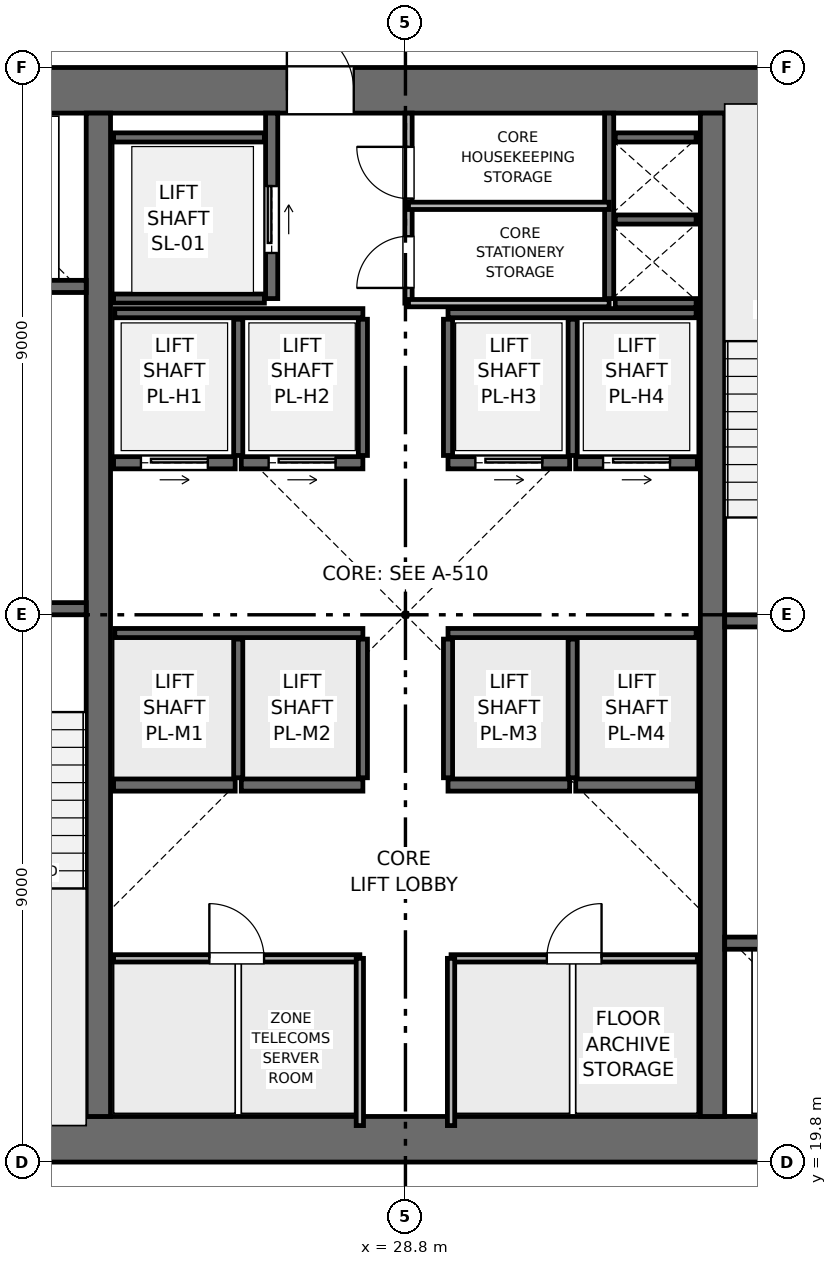
"""IFC4 building model, lengths in metres.
Left out: names, types, materials, properties, quantities, classifications, styles, units other than length and angle.
Written with IfcOpenShell. Run it as: python <this file> out.ifc"""

import sys

from ifc_helpers import new_model, si_unit, direction, frame, frame_2d, origin, place, context, subcontext, project, spatial, rectangle, extrude, element, fill, save


model = new_model("IFC4")
c1 = context("Model", 3, precision=1e-05, world=origin(), true_north=direction((0.0, 1.0)))
c2 = subcontext(c1, "Body", "Model", "MODEL_VIEW")
j1 = project(units=[si_unit("LENGTHUNIT", "METRE"), si_unit("PLANEANGLEUNIT", "RADIAN")], contexts=[c1])
p1 = place(None, origin())
s1 = spatial("IfcSite", under=j1, at=p1, CompositionType="ELEMENT")
p2 = place(p1, origin())
s2 = spatial("IfcBuilding", under=s1, at=p2, CompositionType="ELEMENT")
p3 = place(p2, frame((0.0, 0.0, 246.6)))
s3 = spatial("IfcBuildingStorey", under=s2, at=p3, CompositionType="ELEMENT", Elevation=246.6)
p4 = place(p3, frame((19.8, 20.175, 0.0), z_axis=(0.0, 0.0, 1.0), x_axis=(1.0, 0.0, 0.0)))
e1 = element("IfcWall", 1, at=p4, inside=s3, PredefinedType="SHEAR", context=c2, shape_type="SweptSolid", body=[
    extrude(rectangle(XDim=18.0, YDim=0.75, at=frame_2d((9.0, 0.0))), origin(), (0.0, 0.0, 1.0), 3.75),
])
p5 = place(p3, frame((19.8, 37.425, 0.0), z_axis=(0.0, 0.0, 1.0), x_axis=(1.0, 0.0, 0.0)))
e2 = element("IfcWall", 2, at=p5, inside=s3, PredefinedType="SHEAR", context=c2, shape_type="SweptSolid", body=[
    extrude(rectangle(XDim=18.0, YDim=0.75, at=frame_2d((9.0, 0.0))), origin(), (0.0, 0.0, 1.0), 3.75),
])
p6 = place(p5, frame((7.05, 0.0, 0.0)))
e3 = element("IfcOpeningElement", 3, at=p6, cuts=e2, PredefinedType="OPENING", context=c2, shape_type="SweptSolid", body=[
    extrude(rectangle(XDim=1.1, YDim=2.15, at=frame_2d((0.55, 1.075))), frame((0.0, 0.385, 0.0), z_axis=(0.0, -1.0, 0.0), x_axis=(1.0, 0.0, 0.0)), (0.0, 0.0, 1.0), 0.77),
])
for number, where, z_axis, x_axis in (
    (4, (23.75, 20.55, 0.0), (0.0, 0.0, 1.0), (0.0, 1.0, 0.0)),
    (5, (33.85, 20.55, 0.0), (0.0, 0.0, 1.0), (0.0, 1.0, 0.0)),
):
    element("IfcWall", number, at=place(p3, frame(where, z_axis=z_axis, x_axis=x_axis)), inside=s3, PredefinedType="SHEAR", context=c2, shape_type="SweptSolid", body=[
        extrude(rectangle(XDim=16.5, YDim=0.4, at=frame_2d((8.25, 0.0))), origin(), (0.0, 0.0, 1.0), 3.75),
    ])
p7 = place(p3, frame((20.4, 28.9, 0.0), z_axis=(0.0, 0.0, 1.0), x_axis=(1.0, 0.0, 0.0)))
e6 = element("IfcWall", 6, at=p7, inside=s3, PredefinedType="SHEAR", context=c2, shape_type="SweptSolid", body=[
    extrude(rectangle(XDim=3.15, YDim=0.2, at=frame_2d((1.575, 0.0))), origin(), (0.0, 0.0, 1.0), 3.5),
])
p8 = place(p7, frame((0.8, 0.0, 0.0)))
e7 = element("IfcOpeningElement", 7, at=p8, cuts=e6, PredefinedType="OPENING", context=c2, shape_type="SweptSolid", body=[
    extrude(rectangle(XDim=1.0, YDim=2.1, at=frame_2d((0.5, 1.05))), frame((0.0, 0.11, 0.0), z_axis=(0.0, -1.0, 0.0), x_axis=(1.0, 0.0, 0.0)), (0.0, 0.0, 1.0), 0.22),
])
p9 = place(p3, frame((34.05, 28.7, 0.0), z_axis=(0.0, 0.0, 1.0), x_axis=(1.0, 0.0, 0.0)))
e8 = element("IfcWall", 8, at=p9, inside=s3, PredefinedType="SHEAR", context=c2, shape_type="SweptSolid", body=[
    extrude(rectangle(XDim=3.15, YDim=0.2, at=frame_2d((1.575, 0.0))), origin(), (0.0, 0.0, 1.0), 3.5),
])
p10 = place(p9, frame((0.8, 0.0, 0.0)))
e9 = element("IfcOpeningElement", 9, at=p10, cuts=e8, PredefinedType="OPENING", context=c2, shape_type="SweptSolid", body=[
    extrude(rectangle(XDim=1.0, YDim=2.1, at=frame_2d((0.5, 1.05))), frame((0.0, 0.11, 0.0), z_axis=(0.0, -1.0, 0.0), x_axis=(1.0, 0.0, 0.0)), (0.0, 0.0, 1.0), 0.22),
])
p11 = place(p3, frame((32.15, 34.0, 0.0), z_axis=(0.0, 0.0, 1.0), x_axis=(0.0, 1.0, 0.0)))
e10 = element("IfcWall", 10, at=p11, inside=s3, PredefinedType="SHEAR", context=c2, shape_type="SweptSolid", body=[
    extrude(rectangle(XDim=3.05, YDim=0.15, at=frame_2d((1.525, 0.0))), origin(), (0.0, 0.0, 1.0), 3.5),
])
for number, where, z_axis, x_axis in (
    (11, (32.25, 33.925, 0.0), (0.0, 0.0, 1.0), (1.0, 0.0, 0.0)),
    (12, (32.25, 35.3, 0.0), (0.0, 0.0, 1.0), (1.0, 0.0, 0.0)),
):
    element("IfcWall", number, at=place(p3, frame(where, z_axis=z_axis, x_axis=x_axis)), inside=s3, PredefinedType="SHEAR", context=c2, shape_type="SweptSolid", body=[
        extrude(rectangle(XDim=1.33, YDim=0.15, at=frame_2d((0.665, 0.0))), origin(), (0.0, 0.0, 1.0), 3.5),
    ])
p12 = place(p3, frame((20.5, 34.2, 0.0), z_axis=(0.0, 0.0, 1.0), x_axis=(1.0, 0.0, 0.0)))
e13 = element("IfcWall", 13, at=p12, inside=s3, PredefinedType="SHEAR", context=c2, shape_type="SweptSolid", body=[
    extrude(rectangle(XDim=3.05, YDim=0.2, at=frame_2d((1.525, 0.0))), origin(), (0.0, 0.0, 1.0), 3.5),
])
p13 = place(p12, frame((0.75, 0.0, 0.0)))
e14 = element("IfcOpeningElement", 14, at=p13, cuts=e13, PredefinedType="OPENING", context=c2, shape_type="SweptSolid", body=[
    extrude(rectangle(XDim=1.1, YDim=2.15, at=frame_2d((0.55, 1.075))), frame((0.0, 0.11, 0.0), z_axis=(0.0, -1.0, 0.0), x_axis=(1.0, 0.0, 0.0)), (0.0, 0.0, 1.0), 0.22),
])
p14 = place(p3, frame((34.05, 23.4, 0.0), z_axis=(0.0, 0.0, 1.0), x_axis=(1.0, 0.0, 0.0)))
e15 = element("IfcWall", 15, at=p14, inside=s3, PredefinedType="SHEAR", context=c2, shape_type="SweptSolid", body=[
    extrude(rectangle(XDim=3.05, YDim=0.2, at=frame_2d((1.525, 0.0))), origin(), (0.0, 0.0, 1.0), 3.5),
])
p15 = place(p14, frame((1.2, 0.0, 0.0)))
e16 = element("IfcOpeningElement", 16, at=p15, cuts=e15, PredefinedType="OPENING", context=c2, shape_type="SweptSolid", body=[
    extrude(rectangle(XDim=1.1, YDim=2.15, at=frame_2d((0.55, 1.075))), frame((0.0, 0.11, 0.0), z_axis=(0.0, -1.0, 0.0), x_axis=(1.0, 0.0, 0.0)), (0.0, 0.0, 1.0), 0.22),
])
p16 = place(p3, frame((26.6, 34.0, 0.0), z_axis=(0.0, 0.0, 1.0), x_axis=(0.0, 1.0, 0.0)))
e17 = element("IfcWall", 17, at=p16, inside=s3, PredefinedType="SHEAR", context=c2, shape_type="SweptSolid", body=[
    extrude(rectangle(XDim=3.05, YDim=0.2, at=frame_2d((1.525, 0.0))), origin(), (0.0, 0.0, 1.0), 3.5),
])
p17 = place(p16, frame((0.75, 0.0, 0.0)))
e18 = element("IfcOpeningElement", 18, at=p17, cuts=e17, PredefinedType="OPENING", context=c2, shape_type="SweptSolid", body=[
    extrude(rectangle(XDim=1.1, YDim=2.15, at=frame_2d((0.55, 1.075))), frame((0.0, 0.11, 0.0), z_axis=(0.0, -1.0, 0.0), x_axis=(1.0, 0.0, 0.0)), (0.0, 0.0, 1.0), 0.22),
])
for number, where, z_axis, x_axis in (
    (19, (24.0, 34.0, 0.0), (0.0, 0.0, 1.0), (1.0, 0.0, 0.0)),
    (20, (24.0, 36.65, 0.0), (0.0, 0.0, 1.0), (1.0, 0.0, 0.0)),
):
    element("IfcWall", number, at=place(p3, frame(where, z_axis=z_axis, x_axis=x_axis)), inside=s3, PredefinedType="SHEAR", context=c2, shape_type="SweptSolid", body=[
        extrude(rectangle(XDim=2.48, YDim=0.15, at=frame_2d((1.24, 0.0))), origin(), (0.0, 0.0, 1.0), 3.5),
    ])
for number, where, z_axis, x_axis in (
    (21, (24.0, 26.0, 0.0), (0.0, 0.0, 1.0), (1.0, 0.0, 0.0)),
    (22, (26.1, 26.0, 0.0), (0.0, 0.0, 1.0), (1.0, 0.0, 0.0)),
    (23, (29.5, 26.0, 0.0), (0.0, 0.0, 1.0), (1.0, 0.0, 0.0)),
    (24, (31.6, 26.0, 0.0), (0.0, 0.0, 1.0), (1.0, 0.0, 0.0)),
):
    element("IfcWall", number, at=place(p3, frame(where, z_axis=z_axis, x_axis=x_axis)), inside=s3, PredefinedType="SHEAR", context=c2, shape_type="SweptSolid", body=[
        extrude(rectangle(XDim=2.0, YDim=0.2, at=frame_2d((1.0, 0.0))), origin(), (0.0, 0.0, 1.0), 3.5),
    ])
p18 = place(p3, frame((24.0, 31.3, 0.0), z_axis=(0.0, 0.0, 1.0), x_axis=(1.0, 0.0, 0.0)))
e25 = element("IfcWall", 25, at=p18, inside=s3, PredefinedType="SHEAR", context=c2, shape_type="SweptSolid", body=[
    extrude(rectangle(XDim=2.0, YDim=0.2, at=frame_2d((1.0, 0.0))), origin(), (0.0, 0.0, 1.0), 3.5),
])
p19 = place(p18, frame((0.45, 0.0, 0.0)))
e26 = element("IfcOpeningElement", 26, at=p19, cuts=e25, PredefinedType="OPENING", context=c2, shape_type="SweptSolid", body=[
    extrude(rectangle(XDim=1.1, YDim=2.15, at=frame_2d((0.55, 1.075))), frame((0.0, 0.11, 0.0), z_axis=(0.0, -1.0, 0.0), x_axis=(1.0, 0.0, 0.0)), (0.0, 0.0, 1.0), 0.22),
])
p20 = place(p3, frame((26.1, 31.3, 0.0), z_axis=(0.0, 0.0, 1.0), x_axis=(1.0, 0.0, 0.0)))
e27 = element("IfcWall", 27, at=p20, inside=s3, PredefinedType="SHEAR", context=c2, shape_type="SweptSolid", body=[
    extrude(rectangle(XDim=2.0, YDim=0.2, at=frame_2d((1.0, 0.0))), origin(), (0.0, 0.0, 1.0), 3.5),
])
p21 = place(p20, frame((0.45, 0.0, 0.0)))
e28 = element("IfcOpeningElement", 28, at=p21, cuts=e27, PredefinedType="OPENING", context=c2, shape_type="SweptSolid", body=[
    extrude(rectangle(XDim=1.1, YDim=2.15, at=frame_2d((0.55, 1.075))), frame((0.0, 0.11, 0.0), z_axis=(0.0, -1.0, 0.0), x_axis=(1.0, 0.0, 0.0)), (0.0, 0.0, 1.0), 0.22),
])
p22 = place(p3, frame((29.5, 31.3, 0.0), z_axis=(0.0, 0.0, 1.0), x_axis=(1.0, 0.0, 0.0)))
e29 = element("IfcWall", 29, at=p22, inside=s3, PredefinedType="SHEAR", context=c2, shape_type="SweptSolid", body=[
    extrude(rectangle(XDim=2.0, YDim=0.2, at=frame_2d((1.0, 0.0))), origin(), (0.0, 0.0, 1.0), 3.5),
])
p23 = place(p22, frame((0.45, 0.0, 0.0)))
e30 = element("IfcOpeningElement", 30, at=p23, cuts=e29, PredefinedType="OPENING", context=c2, shape_type="SweptSolid", body=[
    extrude(rectangle(XDim=1.1, YDim=2.15, at=frame_2d((0.55, 1.075))), frame((0.0, 0.11, 0.0), z_axis=(0.0, -1.0, 0.0), x_axis=(1.0, 0.0, 0.0)), (0.0, 0.0, 1.0), 0.22),
])
p24 = place(p3, frame((31.6, 31.3, 0.0), z_axis=(0.0, 0.0, 1.0), x_axis=(1.0, 0.0, 0.0)))
e31 = element("IfcWall", 31, at=p24, inside=s3, PredefinedType="SHEAR", context=c2, shape_type="SweptSolid", body=[
    extrude(rectangle(XDim=2.0, YDim=0.2, at=frame_2d((1.0, 0.0))), origin(), (0.0, 0.0, 1.0), 3.5),
])
p25 = place(p24, frame((0.45, 0.0, 0.0)))
e32 = element("IfcOpeningElement", 32, at=p25, cuts=e31, PredefinedType="OPENING", context=c2, shape_type="SweptSolid", body=[
    extrude(rectangle(XDim=1.1, YDim=2.15, at=frame_2d((0.55, 1.075))), frame((0.0, 0.11, 0.0), z_axis=(0.0, -1.0, 0.0), x_axis=(1.0, 0.0, 0.0)), (0.0, 0.0, 1.0), 0.22),
])
p26 = place(p3, frame((32.25, 36.65, 0.0), z_axis=(0.0, 0.0, 1.0), x_axis=(1.0, 0.0, 0.0)))
e33 = element("IfcWall", 33, at=p26, inside=s3, PredefinedType="SHEAR", context=c2, shape_type="SweptSolid", body=[
    extrude(rectangle(XDim=1.33, YDim=0.15, at=frame_2d((0.665, 0.0))), origin(), (0.0, 0.0, 1.0), 3.5),
])
for number, where, z_axis, x_axis in (
    (34, (24.02, 28.5, 0.0), (0.0, 0.0, 1.0), (1.0, 0.0, 0.0)),
    (35, (29.5, 28.5, 0.0), (0.0, 0.0, 1.0), (1.0, 0.0, 0.0)),
):
    element("IfcWall", number, at=place(p3, frame(where, z_axis=z_axis, x_axis=x_axis)), inside=s3, PredefinedType="SHEAR", context=c2, shape_type="SweptSolid", body=[
        extrude(rectangle(XDim=4.08, YDim=0.15, at=frame_2d((2.04, 0.0))), origin(), (0.0, 0.0, 1.0), 3.5),
    ])
for number, where, z_axis, x_axis in (
    (36, (26.05, 26.12, 0.0), (0.0, 0.0, 1.0), (0.0, 1.0, 0.0)),
    (37, (28.1, 26.12, 0.0), (0.0, 0.0, 1.0), (0.0, 1.0, 0.0)),
    (38, (29.5, 26.12, 0.0), (0.0, 0.0, 1.0), (0.0, 1.0, 0.0)),
    (39, (31.55, 26.12, 0.0), (0.0, 0.0, 1.0), (0.0, 1.0, 0.0)),
):
    element("IfcWall", number, at=place(p3, frame(where, z_axis=z_axis, x_axis=x_axis)), inside=s3, PredefinedType="SHEAR", context=c2, shape_type="SweptSolid", body=[
        extrude(rectangle(XDim=2.28, YDim=0.15, at=frame_2d((1.14, 0.0))), origin(), (0.0, 0.0, 1.0), 3.5),
    ])
for number, where, z_axis, x_axis in (
    (40, (24.02, 33.76, 0.0), (0.0, 0.0, 1.0), (1.0, 0.0, 0.0)),
    (41, (29.5, 33.76, 0.0), (0.0, 0.0, 1.0), (1.0, 0.0, 0.0)),
):
    element("IfcWall", number, at=place(p3, frame(where, z_axis=z_axis, x_axis=x_axis)), inside=s3, PredefinedType="SHEAR", context=c2, shape_type="SweptSolid", body=[
        extrude(rectangle(XDim=4.08, YDim=0.15, at=frame_2d((2.04, 0.0))), origin(), (0.0, 0.0, 1.0), 3.5),
    ])
for number, where, z_axis, x_axis in (
    (42, (26.05, 31.42, 0.0), (0.0, 0.0, 1.0), (0.0, 1.0, 0.0)),
    (43, (28.1, 31.42, 0.0), (0.0, 0.0, 1.0), (0.0, 1.0, 0.0)),
    (44, (29.5, 31.42, 0.0), (0.0, 0.0, 1.0), (0.0, 1.0, 0.0)),
    (45, (31.55, 31.42, 0.0), (0.0, 0.0, 1.0), (0.0, 1.0, 0.0)),
):
    element("IfcWall", number, at=place(p3, frame(where, z_axis=z_axis, x_axis=x_axis)), inside=s3, PredefinedType="SHEAR", context=c2, shape_type="SweptSolid", body=[
        extrude(rectangle(XDim=2.24, YDim=0.15, at=frame_2d((1.12, 0.0))), origin(), (0.0, 0.0, 1.0), 3.5),
    ])
p27 = place(p3, frame((28.85, 33.925, 0.0), z_axis=(0.0, 0.0, 1.0), x_axis=(0.0, 1.0, 0.0)))
e46 = element("IfcWall", 46, at=p27, inside=s3, PredefinedType="PARTITIONING", context=c2, shape_type="SweptSolid", body=[
    extrude(rectangle(XDim=3.125, YDim=0.12, at=frame_2d((1.562, 0.0))), origin(), (0.0, 0.0, 1.0), 3.5),
])
p28 = place(p27, frame((0.25, 0.0, 0.0)))
e47 = element("IfcOpeningElement", 47, at=p28, cuts=e46, PredefinedType="OPENING", context=c2, shape_type="SweptSolid", body=[
    extrude(rectangle(XDim=0.85, YDim=2.1, at=frame_2d((0.425, 1.05))), frame((0.0, 0.07, 0.0), z_axis=(0.0, -1.0, 0.0), x_axis=(1.0, 0.0, 0.0)), (0.0, 0.0, 1.0), 0.14),
])
p29 = place(p27, frame((1.72, 0.0, 0.0)))
e48 = element("IfcOpeningElement", 48, at=p29, cuts=e46, PredefinedType="OPENING", context=c2, shape_type="SweptSolid", body=[
    extrude(rectangle(XDim=0.85, YDim=2.1, at=frame_2d((0.425, 1.05))), frame((0.0, 0.07, 0.0), z_axis=(0.0, -1.0, 0.0), x_axis=(1.0, 0.0, 0.0)), (0.0, 0.0, 1.0), 0.14),
])
for number, where, z_axis, x_axis in (
    (49, (28.85, 35.525, 0.0), (0.0, 0.0, 1.0), (1.0, 0.0, 0.0)),
    (50, (28.85, 33.925, 0.0), (0.0, 0.0, 1.0), (1.0, 0.0, 0.0)),
):
    element("IfcWall", number, at=place(p3, frame(where, z_axis=z_axis, x_axis=x_axis)), inside=s3, PredefinedType="PARTITIONING", context=c2, shape_type="SweptSolid", body=[
        extrude(rectangle(XDim=3.3, YDim=0.12, at=frame_2d((1.65, 0.0))), origin(), (0.0, 0.0, 1.0), 3.5),
    ])
p30 = place(p3, frame((24.0, 23.15, 0.0), z_axis=(0.0, 0.0, 1.0), x_axis=(1.0, 0.0, 0.0)))
e51 = element("IfcWall", 51, at=p30, inside=s3, PredefinedType="PARTITIONING", context=c2, shape_type="SweptSolid", body=[
    extrude(rectangle(XDim=4.05, YDim=0.12, at=frame_2d((2.025, 0.0))), origin(), (0.0, 0.0, 1.0), 3.5),
])
p31 = place(p30, frame((1.575, 0.0, 0.0)))
e52 = element("IfcOpeningElement", 52, at=p31, cuts=e51, PredefinedType="OPENING", context=c2, shape_type="SweptSolid", body=[
    extrude(rectangle(XDim=0.9, YDim=2.1, at=frame_2d((0.45, 1.05))), frame((0.0, 0.07, 0.0), z_axis=(0.0, -1.0, 0.0), x_axis=(1.0, 0.0, 0.0)), (0.0, 0.0, 1.0), 0.14),
])
p32 = place(p3, frame((28.05, 20.4, 0.0), z_axis=(0.0, 0.0, 1.0), x_axis=(0.0, 1.0, 0.0)))
e53 = element("IfcWall", 53, at=p32, inside=s3, PredefinedType="PARTITIONING", context=c2, shape_type="SweptSolid", body=[
    extrude(rectangle(XDim=2.75, YDim=0.12, at=frame_2d((1.375, 0.0))), origin(), (0.0, 0.0, 1.0), 3.5),
])
p33 = place(p3, frame((29.55, 23.15, 0.0), z_axis=(0.0, 0.0, 1.0), x_axis=(1.0, 0.0, 0.0)))
e54 = element("IfcWall", 54, at=p33, inside=s3, PredefinedType="PARTITIONING", context=c2, shape_type="SweptSolid", body=[
    extrude(rectangle(XDim=4.05, YDim=0.12, at=frame_2d((2.025, 0.0))), origin(), (0.0, 0.0, 1.0), 3.5),
])
p34 = place(p33, frame((1.575, 0.0, 0.0)))
e55 = element("IfcOpeningElement", 55, at=p34, cuts=e54, PredefinedType="OPENING", context=c2, shape_type="SweptSolid", body=[
    extrude(rectangle(XDim=0.9, YDim=2.1, at=frame_2d((0.45, 1.05))), frame((0.0, 0.07, 0.0), z_axis=(0.0, -1.0, 0.0), x_axis=(1.0, 0.0, 0.0)), (0.0, 0.0, 1.0), 0.14),
])
p35 = place(p3, frame((29.55, 20.4, 0.0), z_axis=(0.0, 0.0, 1.0), x_axis=(0.0, 1.0, 0.0)))
e56 = element("IfcWall", 56, at=p35, inside=s3, PredefinedType="PARTITIONING", context=c2, shape_type="SweptSolid", body=[
    extrude(rectangle(XDim=2.75, YDim=0.12, at=frame_2d((1.375, 0.0))), origin(), (0.0, 0.0, 1.0), 3.5),
])
p36 = place(p17, origin())
e57 = element("IfcDoor", 57, at=p36, inside=s3, OperationType="SLIDING_TO_RIGHT", PredefinedType="DOOR", context=c2, shape_type="SweptSolid", body=[
    extrude(rectangle(XDim=1.1, YDim=2.15, at=frame_2d((0.55, 1.075))), frame((0.0, 0.025, 0.0), z_axis=(0.0, -1.0, 0.0), x_axis=(1.0, 0.0, 0.0)), (0.0, 0.0, 1.0), 0.05),
])
fill(e18, e57)
p37 = place(p19, origin())
e58 = element("IfcDoor", 58, at=p37, inside=s3, OperationType="SLIDING_TO_RIGHT", PredefinedType="DOOR", context=c2, shape_type="SweptSolid", body=[
    extrude(rectangle(XDim=1.1, YDim=2.15, at=frame_2d((0.55, 1.075))), frame((0.0, 0.025, 0.0), z_axis=(0.0, -1.0, 0.0), x_axis=(1.0, 0.0, 0.0)), (0.0, 0.0, 1.0), 0.05),
])
fill(e26, e58)
p38 = place(p21, origin())
e59 = element("IfcDoor", 59, at=p38, inside=s3, OperationType="SLIDING_TO_RIGHT", PredefinedType="DOOR", context=c2, shape_type="SweptSolid", body=[
    extrude(rectangle(XDim=1.1, YDim=2.15, at=frame_2d((0.55, 1.075))), frame((0.0, 0.025, 0.0), z_axis=(0.0, -1.0, 0.0), x_axis=(1.0, 0.0, 0.0)), (0.0, 0.0, 1.0), 0.05),
])
fill(e28, e59)
p39 = place(p23, origin())
e60 = element("IfcDoor", 60, at=p39, inside=s3, OperationType="SLIDING_TO_RIGHT", PredefinedType="DOOR", context=c2, shape_type="SweptSolid", body=[
    extrude(rectangle(XDim=1.1, YDim=2.15, at=frame_2d((0.55, 1.075))), frame((0.0, 0.025, 0.0), z_axis=(0.0, -1.0, 0.0), x_axis=(1.0, 0.0, 0.0)), (0.0, 0.0, 1.0), 0.05),
])
fill(e30, e60)
p40 = place(p25, origin())
e61 = element("IfcDoor", 61, at=p40, inside=s3, OperationType="SLIDING_TO_RIGHT", PredefinedType="DOOR", context=c2, shape_type="SweptSolid", body=[
    extrude(rectangle(XDim=1.1, YDim=2.15, at=frame_2d((0.55, 1.075))), frame((0.0, 0.025, 0.0), z_axis=(0.0, -1.0, 0.0), x_axis=(1.0, 0.0, 0.0)), (0.0, 0.0, 1.0), 0.05),
])
fill(e32, e61)
p41 = place(p28, origin())
e62 = element("IfcDoor", 62, at=p41, inside=s3, OperationType="SINGLE_SWING_LEFT", PredefinedType="DOOR", context=c2, shape_type="SweptSolid", body=[
    extrude(rectangle(XDim=0.85, YDim=2.1, at=frame_2d((0.425, 1.05))), frame((0.0, 0.025, 0.0), z_axis=(0.0, -1.0, 0.0), x_axis=(1.0, 0.0, 0.0)), (0.0, 0.0, 1.0), 0.05),
])
fill(e47, e62)
p42 = place(p29, origin())
e63 = element("IfcDoor", 63, at=p42, inside=s3, OperationType="SINGLE_SWING_RIGHT", PredefinedType="DOOR", context=c2, shape_type="SweptSolid", body=[
    extrude(rectangle(XDim=0.85, YDim=2.1, at=frame_2d((0.425, 1.05))), frame((0.0, 0.025, 0.0), z_axis=(0.0, -1.0, 0.0), x_axis=(1.0, 0.0, 0.0)), (0.0, 0.0, 1.0), 0.05),
])
fill(e48, e63)
p43 = place(p31, origin())
e64 = element("IfcDoor", 64, at=p43, inside=s3, OperationType="SINGLE_SWING_LEFT", PredefinedType="DOOR", context=c2, shape_type="SweptSolid", body=[
    extrude(rectangle(XDim=0.9, YDim=2.1, at=frame_2d((0.45, 1.05))), frame((0.0, 0.025, 0.0), z_axis=(0.0, -1.0, 0.0), x_axis=(1.0, 0.0, 0.0)), (0.0, 0.0, 1.0), 0.05),
])
fill(e52, e64)
p44 = place(p34, origin())
e65 = element("IfcDoor", 65, at=p44, inside=s3, OperationType="SINGLE_SWING_RIGHT", PredefinedType="DOOR", context=c2, shape_type="SweptSolid", body=[
    extrude(rectangle(XDim=0.9, YDim=2.1, at=frame_2d((0.45, 1.05))), frame((0.0, 0.025, 0.0), z_axis=(0.0, -1.0, 0.0), x_axis=(1.0, 0.0, 0.0)), (0.0, 0.0, 1.0), 0.05),
])
fill(e55, e65)
p45 = place(p6, origin())
e66 = element("IfcDoor", 66, at=p45, inside=s3, OperationType="SINGLE_SWING_LEFT", PredefinedType="DOOR", context=c2, shape_type="SweptSolid", body=[
    extrude(rectangle(XDim=1.1, YDim=2.15, at=frame_2d((0.55, 1.075))), frame((0.0, 0.025, 0.0), z_axis=(0.0, -1.0, 0.0), x_axis=(1.0, 0.0, 0.0)), (0.0, 0.0, 1.0), 0.05),
])
fill(e3, e66)
save(model, sys.argv[1])
